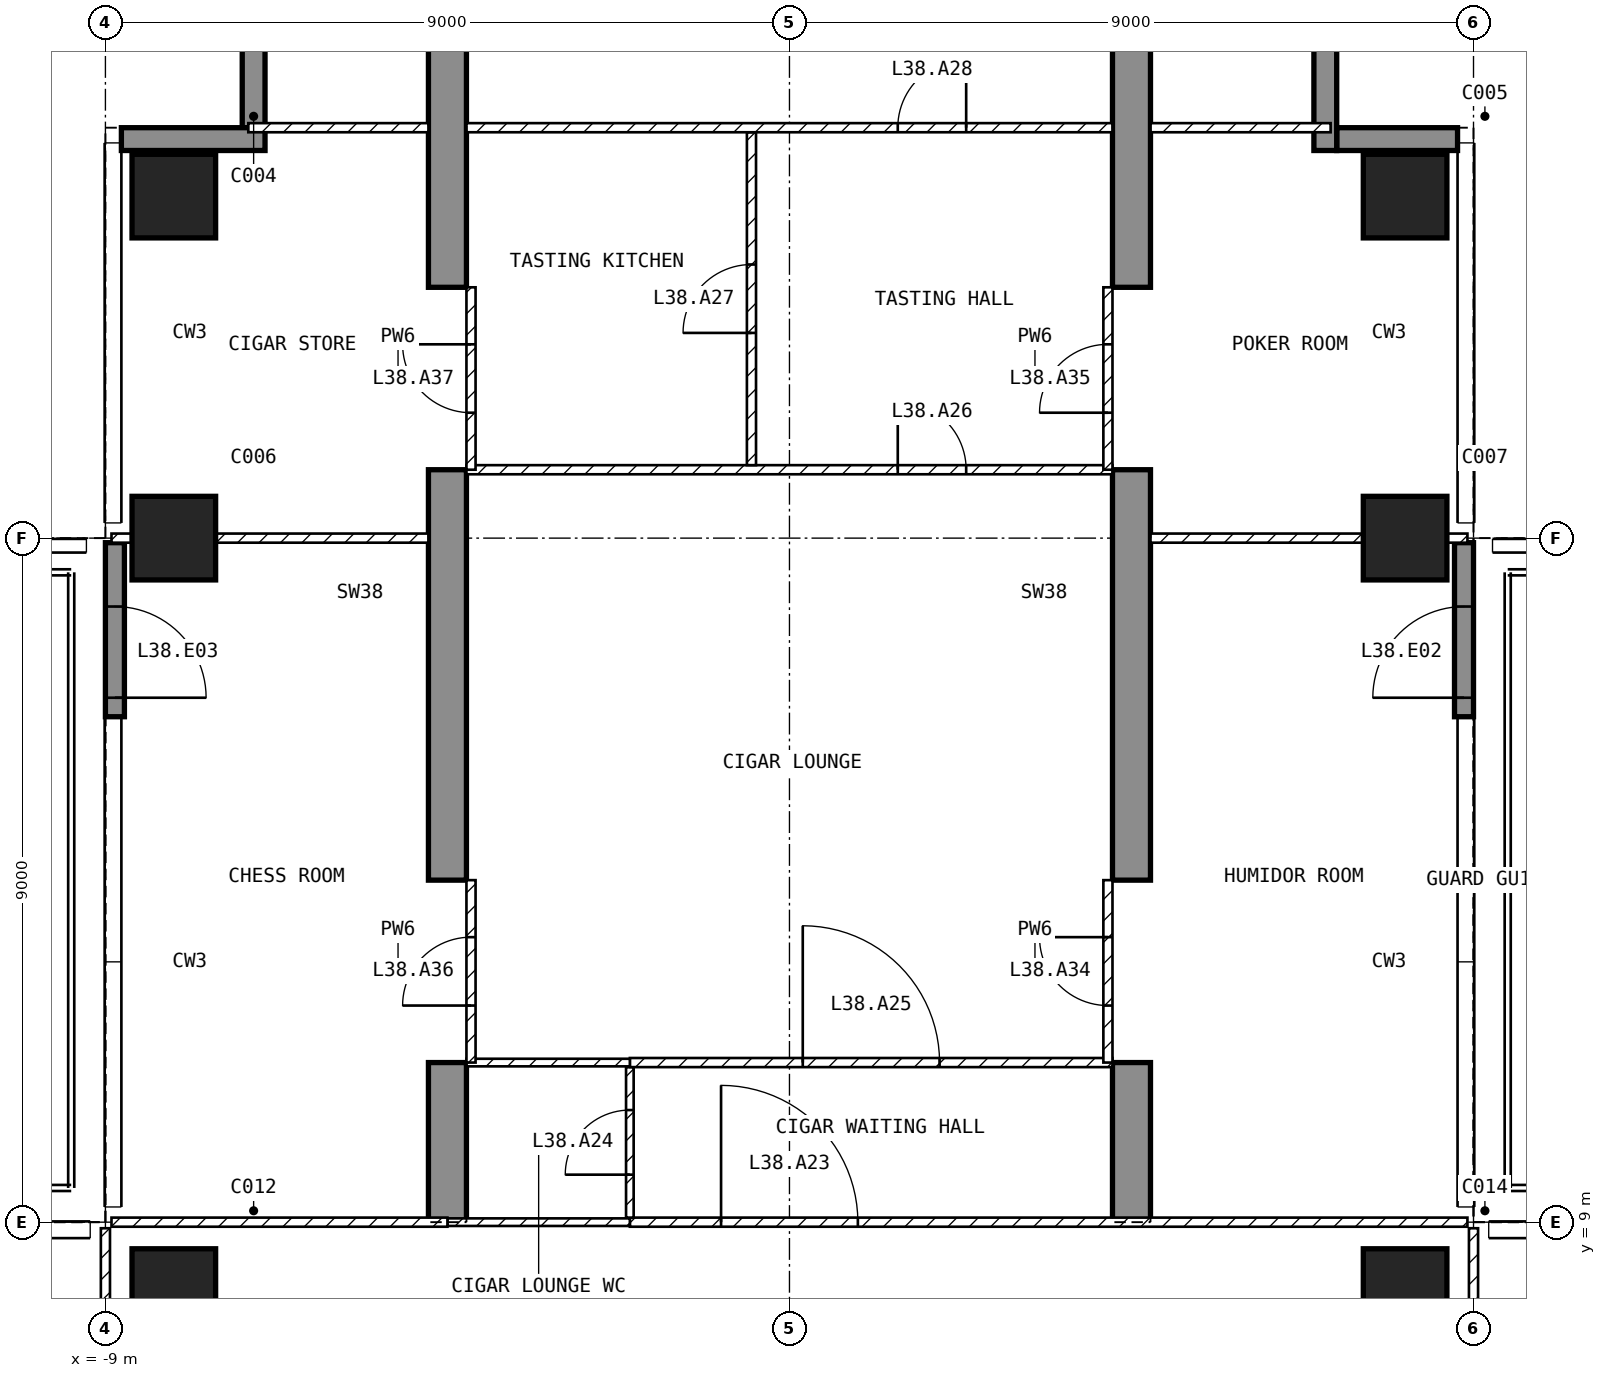
"""IFC4 building model, lengths in metres.
Left out: names, types, materials, properties, quantities, classifications, styles, units other than length and angle.
Written with IfcOpenShell. Run it as: python <this file> out.ifc"""

import sys

from ifc_helpers import new_model, si_unit, direction, frame, frame_2d, origin, origin_2d, place, context, subcontext, project, spatial, polyline, rectangle, outline, extrude, element, fill, save


model = new_model("IFC4")
c1 = context("Model", 3, precision=1e-05, world=origin(), true_north=direction((0.0, 1.0)))
c2 = subcontext(c1, "Body", "Model", "MODEL_VIEW")
j1 = project(units=[si_unit("LENGTHUNIT", "METRE"), si_unit("PLANEANGLEUNIT", "RADIAN")], contexts=[c1])
p1 = place(None, origin())
s1 = spatial("IfcSite", under=j1, at=p1, CompositionType="ELEMENT")
p2 = place(p1, origin())
s2 = spatial("IfcBuilding", under=s1, at=p2, CompositionType="ELEMENT")
p3 = place(p2, frame((0.0, 0.0, 154.9)))
s3 = spatial("IfcBuildingStorey", under=s2, at=p3, CompositionType="ELEMENT", Elevation=154.9)
for number, where, z_axis, x_axis in (
    (1, (-8.1, 8.1, -0.3), (0.0, 0.0, 1.0), (1.0, 0.0, 0.0)),
    (2, (-8.1, 18.0, -0.3), (0.0, 0.0, 1.0), (1.0, 0.0, 0.0)),
    (3, (-8.1, 22.5, -0.3), (0.0, 0.0, 1.0), (1.0, 0.0, 0.0)),
    (4, (8.1, 8.1, -0.3), (0.0, 0.0, 1.0), (1.0, 0.0, 0.0)),
    (5, (8.1, 18.0, -0.3), (0.0, 0.0, 1.0), (1.0, 0.0, 0.0)),
    (6, (8.1, 22.5, -0.3), (0.0, 0.0, 1.0), (1.0, 0.0, 0.0)),
):
    element("IfcColumn", number, at=place(p3, frame(where, z_axis=z_axis, x_axis=x_axis)), inside=s3, PredefinedType="COLUMN", context=c2, shape_type="SweptSolid", body=[
        extrude(rectangle(XDim=1.1, YDim=1.1, at=origin_2d()), origin(), (0.0, 0.0, 1.0), 7.05),
    ])
for number, where, z_axis, x_axis in (
    (7, (-4.75, 9.0, -0.3), (1.0, 0.0, 0.0), (0.0, 1.0, 0.0)),
    (8, (4.25, 9.0, -0.3), (1.0, 0.0, 0.0), (0.0, 1.0, 0.0)),
):
    element("IfcWall", number, at=place(p3, frame(where, z_axis=z_axis, x_axis=x_axis)), inside=s3, PredefinedType="SHEAR", context=c2, shape_type="SweptSolid", body=[
        extrude(outline(polyline([(0.0, 0.0), (2.1, 0.0), (2.1, 2.7), (4.5, 2.7), (4.5, 0.0), (9.9, 0.0), (9.9, 2.7), (12.3, 2.7), (12.3, 0.0), (16.55, 0.0), (16.55, 7.05), (0.0, 7.05), (0.0, 0.0)])), origin(), (0.0, 0.0, 1.0), 0.5),
    ])
p4 = place(p3, frame((8.875, 15.65, 0.0), z_axis=(0.0, 0.0, 1.0), x_axis=(0.0, 1.0, 0.0)))
e9 = element("IfcWall", 9, at=p4, inside=s3, PredefinedType="SOLIDWALL", context=c2, shape_type="SweptSolid", body=[
    extrude(rectangle(XDim=2.29, YDim=0.25, at=frame_2d((1.145, 0.0))), origin(), (0.0, 0.0, 1.0), 6.75),
])
p5 = place(p4, frame((0.25, 0.0, 0.0)))
e10 = element("IfcOpeningElement", 10, at=p5, cuts=e9, PredefinedType="OPENING", context=c2, shape_type="SweptSolid", body=[
    extrude(rectangle(XDim=1.2, YDim=2.4, at=frame_2d((0.6, 1.2))), frame((0.0, 0.135, 0.0), z_axis=(0.0, -1.0, 0.0), x_axis=(1.0, 0.0, 0.0)), (0.0, 0.0, 1.0), 0.27),
])
p6 = place(p3, frame((-8.875, 17.94, 0.0), z_axis=(0.0, 0.0, 1.0), x_axis=(0.0, -1.0, 0.0)))
e11 = element("IfcWall", 11, at=p6, inside=s3, PredefinedType="SOLIDWALL", context=c2, shape_type="SweptSolid", body=[
    extrude(rectangle(XDim=2.29, YDim=0.25, at=frame_2d((1.145, 0.0))), origin(), (0.0, 0.0, 1.0), 6.75),
])
p7 = place(p6, frame((0.84, 0.0, 0.0)))
e12 = element("IfcOpeningElement", 12, at=p7, cuts=e11, PredefinedType="OPENING", context=c2, shape_type="SweptSolid", body=[
    extrude(rectangle(XDim=1.2, YDim=2.4, at=frame_2d((0.6, 1.2))), frame((0.0, 0.135, 0.0), z_axis=(0.0, -1.0, 0.0), x_axis=(1.0, 0.0, 0.0)), (0.0, 0.0, 1.0), 0.27),
])
p8 = place(p3, frame((8.79, 23.25, 0.0), z_axis=(0.0, 0.0, 1.0), x_axis=(-1.0, 0.0, 0.0)))
e13 = element("IfcWall", 13, at=p8, inside=s3, PredefinedType="SOLIDWALL", context=c2, shape_type="SweptSolid", body=[
    extrude(rectangle(XDim=1.59, YDim=0.3, at=frame_2d((0.795, 0.0))), origin(), (0.0, 0.0, 1.0), 6.75),
])
p9 = place(p3, frame((7.05, 23.1, 0.0), z_axis=(0.0, 0.0, 1.0), x_axis=(0.0, 1.0, 0.0)))
e14 = element("IfcWall", 14, at=p9, inside=s3, PredefinedType="SOLIDWALL", context=c2, shape_type="SweptSolid", body=[
    extrude(rectangle(XDim=1.8, YDim=0.3, at=frame_2d((0.9, 0.0))), origin(), (0.0, 0.0, 1.0), 6.75),
])
p10 = place(p3, frame((-7.05, 25.2, 0.0), z_axis=(0.0, 0.0, 1.0), x_axis=(0.0, -1.0, 0.0)))
e15 = element("IfcWall", 15, at=p10, inside=s3, PredefinedType="SOLIDWALL", context=c2, shape_type="SweptSolid", body=[
    extrude(rectangle(XDim=1.8, YDim=0.3, at=frame_2d((0.9, 0.0))), origin(), (0.0, 0.0, 1.0), 6.75),
])
p11 = place(p3, frame((-6.9, 23.25, 0.0), z_axis=(0.0, 0.0, 1.0), x_axis=(-1.0, 0.0, 0.0)))
e16 = element("IfcWall", 16, at=p11, inside=s3, PredefinedType="SOLIDWALL", context=c2, shape_type="SweptSolid", body=[
    extrude(rectangle(XDim=1.89, YDim=0.3, at=frame_2d((0.945, 0.0))), origin(), (0.0, 0.0, 1.0), 6.75),
])
p12 = place(p3, frame((9.0, 8.92, 0.0), z_axis=(0.0, 0.0, 1.0), x_axis=(0.0, -1.0, 0.0)))
e17 = element("IfcWall", 17, at=p12, inside=s3, PredefinedType="PARTITIONING", context=c2, shape_type="SweptSolid", body=[
    extrude(rectangle(XDim=7.66, YDim=0.12, at=frame_2d((3.83, 0.0))), origin(), (0.0, 0.0, 1.0), 6.75),
])
p13 = place(p12, frame((5.74, 0.0, 0.0)))
e18 = element("IfcOpeningElement", 18, at=p13, cuts=e17, PredefinedType="OPENING", context=c2, shape_type="SweptSolid", body=[
    extrude(rectangle(XDim=0.9, YDim=2.1, at=frame_2d((0.45, 1.05))), frame((0.0, 0.07, 0.0), z_axis=(0.0, -1.0, 0.0), x_axis=(1.0, 0.0, 0.0)), (0.0, 0.0, 1.0), 0.14),
])
p14 = place(p3, frame((-9.0, 1.26, 0.0), z_axis=(0.0, 0.0, 1.0), x_axis=(0.0, 1.0, 0.0)))
e19 = element("IfcWall", 19, at=p14, inside=s3, PredefinedType="PARTITIONING", context=c2, shape_type="SweptSolid", body=[
    extrude(rectangle(XDim=7.66, YDim=0.12, at=frame_2d((3.83, 0.0))), origin(), (0.0, 0.0, 1.0), 6.75),
])
p15 = place(p3, frame((-2.1, 9.0, 0.0), z_axis=(0.0, 0.0, 1.0), x_axis=(1.0, 0.0, 0.0)))
e20 = element("IfcWall", 20, at=p15, inside=s3, PredefinedType="PARTITIONING", context=c2, shape_type="SweptSolid", body=[
    extrude(rectangle(XDim=11.02, YDim=0.12, at=frame_2d((5.51, 0.0))), origin(), (0.0, 0.0, 1.0), 6.75),
])
p16 = place(p15, frame((1.2, 0.0, 0.0)))
e21 = element("IfcOpeningElement", 21, at=p16, cuts=e20, PredefinedType="OPENING", context=c2, shape_type="SweptSolid", body=[
    extrude(rectangle(XDim=1.8, YDim=2.1, at=frame_2d((0.9, 1.05))), frame((0.0, 0.07, 0.0), z_axis=(0.0, -1.0, 0.0), x_axis=(1.0, 0.0, 0.0)), (0.0, 0.0, 1.0), 0.14),
])
p17 = place(p3, frame((-4.5, 9.0, 0.0), z_axis=(0.0, 0.0, 1.0), x_axis=(1.0, 0.0, 0.0)))
e22 = element("IfcWall", 22, at=p17, inside=s3, PredefinedType="PARTITIONING", context=c2, shape_type="SweptSolid", body=[
    extrude(rectangle(XDim=2.4, YDim=0.1, at=frame_2d((1.2, 0.0))), origin(), (0.0, 0.0, 1.0), 6.75),
])
p18 = place(p3, frame((-8.92, 9.0, 0.0), z_axis=(0.0, 0.0, 1.0), x_axis=(1.0, 0.0, 0.0)))
e23 = element("IfcWall", 23, at=p18, inside=s3, PredefinedType="PARTITIONING", context=c2, shape_type="SweptSolid", body=[
    extrude(rectangle(XDim=4.42, YDim=0.12, at=frame_2d((2.21, 0.0))), origin(), (0.0, 0.0, 1.0), 6.75),
])
p19 = place(p3, frame((-2.1, 9.06, 0.0), z_axis=(0.0, 0.0, 1.0), x_axis=(0.0, 1.0, 0.0)))
e24 = element("IfcWall", 24, at=p19, inside=s3, PredefinedType="PARTITIONING", context=c2, shape_type="SweptSolid", body=[
    extrude(rectangle(XDim=1.98, YDim=0.1, at=frame_2d((0.99, 0.0))), origin(), (0.0, 0.0, 1.0), 6.75),
])
p20 = place(p19, frame((0.565, 0.0, 0.0)))
e25 = element("IfcOpeningElement", 25, at=p20, cuts=e24, PredefinedType="OPENING", context=c2, shape_type="SweptSolid", body=[
    extrude(rectangle(XDim=0.85, YDim=2.1, at=frame_2d((0.425, 1.05))), frame((0.0, 0.06, 0.0), z_axis=(0.0, -1.0, 0.0), x_axis=(1.0, 0.0, 0.0)), (0.0, 0.0, 1.0), 0.12),
])
p21 = place(p3, frame((-2.1, 11.1, 0.0), z_axis=(0.0, 0.0, 1.0), x_axis=(1.0, 0.0, 0.0)))
e26 = element("IfcWall", 26, at=p21, inside=s3, PredefinedType="PARTITIONING", context=c2, shape_type="SweptSolid", body=[
    extrude(rectangle(XDim=6.35, YDim=0.12, at=frame_2d((3.175, 0.0))), origin(), (0.0, 0.0, 1.0), 6.75),
])
p22 = place(p21, frame((2.275, 0.0, 0.0)))
e27 = element("IfcOpeningElement", 27, at=p22, cuts=e26, PredefinedType="OPENING", context=c2, shape_type="SweptSolid", body=[
    extrude(rectangle(XDim=1.8, YDim=2.1, at=frame_2d((0.9, 1.05))), frame((0.0, 0.07, 0.0), z_axis=(0.0, -1.0, 0.0), x_axis=(1.0, 0.0, 0.0)), (0.0, 0.0, 1.0), 0.14),
])
p23 = place(p3, frame((-4.25, 11.1, 0.0), z_axis=(0.0, 0.0, 1.0), x_axis=(1.0, 0.0, 0.0)))
e28 = element("IfcWall", 28, at=p23, inside=s3, PredefinedType="PARTITIONING", context=c2, shape_type="SweptSolid", body=[
    extrude(rectangle(XDim=2.15, YDim=0.1, at=frame_2d((1.075, 0.0))), origin(), (0.0, 0.0, 1.0), 6.75),
])
p24 = place(p3, frame((-4.25, 18.9, 0.0), z_axis=(0.0, 0.0, 1.0), x_axis=(1.0, 0.0, 0.0)))
e29 = element("IfcWall", 29, at=p24, inside=s3, PredefinedType="PARTITIONING", context=c2, shape_type="SweptSolid", body=[
    extrude(rectangle(XDim=8.5, YDim=0.12, at=frame_2d((4.25, 0.0))), origin(), (0.0, 0.0, 1.0), 6.75),
])
p25 = place(p24, frame((5.675, 0.0, 0.0)))
e30 = element("IfcOpeningElement", 30, at=p25, cuts=e29, PredefinedType="OPENING", context=c2, shape_type="SweptSolid", body=[
    extrude(rectangle(XDim=0.9, YDim=2.1, at=frame_2d((0.45, 1.05))), frame((0.0, 0.07, 0.0), z_axis=(0.0, -1.0, 0.0), x_axis=(1.0, 0.0, 0.0)), (0.0, 0.0, 1.0), 0.14),
])
p26 = place(p3, frame((-0.5, 18.96, 0.0), z_axis=(0.0, 0.0, 1.0), x_axis=(0.0, 1.0, 0.0)))
e31 = element("IfcWall", 31, at=p26, inside=s3, PredefinedType="PARTITIONING", context=c2, shape_type="SweptSolid", body=[
    extrude(rectangle(XDim=4.38, YDim=0.12, at=frame_2d((2.19, 0.0))), origin(), (0.0, 0.0, 1.0), 6.75),
])
p27 = place(p26, frame((1.74, 0.0, 0.0)))
e32 = element("IfcOpeningElement", 32, at=p27, cuts=e31, PredefinedType="OPENING", context=c2, shape_type="SweptSolid", body=[
    extrude(rectangle(XDim=0.9, YDim=2.1, at=frame_2d((0.45, 1.05))), frame((0.0, 0.07, 0.0), z_axis=(0.0, -1.0, 0.0), x_axis=(1.0, 0.0, 0.0)), (0.0, 0.0, 1.0), 0.14),
])
p28 = place(p3, frame((-4.25, 23.4, 0.0), z_axis=(0.0, 0.0, 1.0), x_axis=(1.0, 0.0, 0.0)))
e33 = element("IfcWall", 33, at=p28, inside=s3, PredefinedType="PARTITIONING", context=c2, shape_type="SweptSolid", body=[
    extrude(rectangle(XDim=8.5, YDim=0.12, at=frame_2d((4.25, 0.0))), origin(), (0.0, 0.0, 1.0), 6.75),
])
p29 = place(p28, frame((5.675, 0.0, 0.0)))
e34 = element("IfcOpeningElement", 34, at=p29, cuts=e33, PredefinedType="OPENING", context=c2, shape_type="SweptSolid", body=[
    extrude(rectangle(XDim=0.9, YDim=2.1, at=frame_2d((0.45, 1.05))), frame((0.0, 0.07, 0.0), z_axis=(0.0, -1.0, 0.0), x_axis=(1.0, 0.0, 0.0)), (0.0, 0.0, 1.0), 0.14),
])
p30 = place(p3, frame((4.75, 18.0, 0.0), z_axis=(0.0, 0.0, 1.0), x_axis=(1.0, 0.0, 0.0)))
e35 = element("IfcWall", 35, at=p30, inside=s3, PredefinedType="PARTITIONING", context=c2, shape_type="SweptSolid", body=[
    extrude(rectangle(XDim=4.17, YDim=0.12, at=frame_2d((2.085, 0.0))), origin(), (0.0, 0.0, 1.0), 5.914),
])
p31 = place(p3, frame((4.75, 23.4, 0.0), z_axis=(0.0, 0.0, 1.0), x_axis=(1.0, 0.0, 0.0)))
e36 = element("IfcWall", 36, at=p31, inside=s3, PredefinedType="PARTITIONING", context=c2, shape_type="SweptSolid", body=[
    extrude(rectangle(XDim=2.37, YDim=0.12, at=frame_2d((1.185, 0.0))), origin(), (0.0, 0.0, 1.0), 6.75),
])
p32 = place(p3, frame((-8.92, 18.0, 0.0), z_axis=(0.0, 0.0, 1.0), x_axis=(1.0, 0.0, 0.0)))
e37 = element("IfcWall", 37, at=p32, inside=s3, PredefinedType="PARTITIONING", context=c2, shape_type="SweptSolid", body=[
    extrude(rectangle(XDim=4.17, YDim=0.12, at=frame_2d((2.085, 0.0))), origin(), (0.0, 0.0, 1.0), 5.914),
])
p33 = place(p3, frame((-7.12, 23.4, 0.0), z_axis=(0.0, 0.0, 1.0), x_axis=(1.0, 0.0, 0.0)))
e38 = element("IfcWall", 38, at=p33, inside=s3, PredefinedType="PARTITIONING", context=c2, shape_type="SweptSolid", body=[
    extrude(rectangle(XDim=2.37, YDim=0.12, at=frame_2d((1.185, 0.0))), origin(), (0.0, 0.0, 1.0), 6.75),
])
p34 = place(p3, frame((4.19, 11.1, 0.0), z_axis=(0.0, 0.0, 1.0), x_axis=(0.0, 1.0, 0.0)))
e39 = element("IfcWall", 39, at=p34, inside=s3, PredefinedType="PARTITIONING", context=c2, shape_type="SweptSolid", body=[
    extrude(rectangle(XDim=2.4, YDim=0.12, at=frame_2d((1.2, 0.0))), origin(), (0.0, 0.0, 1.0), 2.4),
])
p35 = place(p34, frame((0.75, 0.0, 0.0)))
e40 = element("IfcOpeningElement", 40, at=p35, cuts=e39, PredefinedType="OPENING", context=c2, shape_type="SweptSolid", body=[
    extrude(rectangle(XDim=0.9, YDim=2.1, at=frame_2d((0.45, 1.05))), frame((0.0, 0.07, 0.0), z_axis=(0.0, -1.0, 0.0), x_axis=(1.0, 0.0, 0.0)), (0.0, 0.0, 1.0), 0.14),
])
p36 = place(p3, frame((4.19, 18.9, 0.0), z_axis=(0.0, 0.0, 1.0), x_axis=(0.0, 1.0, 0.0)))
e41 = element("IfcWall", 41, at=p36, inside=s3, PredefinedType="PARTITIONING", context=c2, shape_type="SweptSolid", body=[
    extrude(rectangle(XDim=2.4, YDim=0.12, at=frame_2d((1.2, 0.0))), origin(), (0.0, 0.0, 1.0), 2.4),
])
p37 = place(p36, frame((0.75, 0.0, 0.0)))
e42 = element("IfcOpeningElement", 42, at=p37, cuts=e41, PredefinedType="OPENING", context=c2, shape_type="SweptSolid", body=[
    extrude(rectangle(XDim=0.9, YDim=2.1, at=frame_2d((0.45, 1.05))), frame((0.0, 0.07, 0.0), z_axis=(0.0, -1.0, 0.0), x_axis=(1.0, 0.0, 0.0)), (0.0, 0.0, 1.0), 0.14),
])
p38 = place(p3, frame((-4.19, 11.1, 0.0), z_axis=(0.0, 0.0, 1.0), x_axis=(0.0, 1.0, 0.0)))
e43 = element("IfcWall", 43, at=p38, inside=s3, PredefinedType="PARTITIONING", context=c2, shape_type="SweptSolid", body=[
    extrude(rectangle(XDim=2.4, YDim=0.12, at=frame_2d((1.2, 0.0))), origin(), (0.0, 0.0, 1.0), 2.4),
])
p39 = place(p38, frame((0.75, 0.0, 0.0)))
e44 = element("IfcOpeningElement", 44, at=p39, cuts=e43, PredefinedType="OPENING", context=c2, shape_type="SweptSolid", body=[
    extrude(rectangle(XDim=0.9, YDim=2.1, at=frame_2d((0.45, 1.05))), frame((0.0, 0.07, 0.0), z_axis=(0.0, -1.0, 0.0), x_axis=(1.0, 0.0, 0.0)), (0.0, 0.0, 1.0), 0.14),
])
p40 = place(p3, frame((-4.19, 18.9, 0.0), z_axis=(0.0, 0.0, 1.0), x_axis=(0.0, 1.0, 0.0)))
e45 = element("IfcWall", 45, at=p40, inside=s3, PredefinedType="PARTITIONING", context=c2, shape_type="SweptSolid", body=[
    extrude(rectangle(XDim=2.4, YDim=0.12, at=frame_2d((1.2, 0.0))), origin(), (0.0, 0.0, 1.0), 2.4),
])
p41 = place(p40, frame((0.75, 0.0, 0.0)))
e46 = element("IfcOpeningElement", 46, at=p41, cuts=e45, PredefinedType="OPENING", context=c2, shape_type="SweptSolid", body=[
    extrude(rectangle(XDim=0.9, YDim=2.1, at=frame_2d((0.45, 1.05))), frame((0.0, 0.07, 0.0), z_axis=(0.0, -1.0, 0.0), x_axis=(1.0, 0.0, 0.0)), (0.0, 0.0, 1.0), 0.14),
])
p42 = place(p5, origin())
e47 = element("IfcDoor", 47, at=p42, inside=s3, OperationType="SINGLE_SWING_LEFT", PredefinedType="DOOR", context=c2, shape_type="SweptSolid", body=[
    extrude(rectangle(XDim=1.2, YDim=2.4, at=frame_2d((0.6, 1.2))), frame((0.0, 0.025, 0.0), z_axis=(0.0, -1.0, 0.0), x_axis=(1.0, 0.0, 0.0)), (0.0, 0.0, 1.0), 0.05),
])
fill(e10, e47)
p43 = place(p7, origin())
e48 = element("IfcDoor", 48, at=p43, inside=s3, OperationType="SINGLE_SWING_RIGHT", PredefinedType="DOOR", context=c2, shape_type="SweptSolid", body=[
    extrude(rectangle(XDim=1.2, YDim=2.4, at=frame_2d((0.6, 1.2))), frame((0.0, 0.025, 0.0), z_axis=(0.0, -1.0, 0.0), x_axis=(1.0, 0.0, 0.0)), (0.0, 0.0, 1.0), 0.05),
])
fill(e12, e48)
p44 = place(p16, origin())
e49 = element("IfcDoor", 49, at=p44, inside=s3, OperationType="SINGLE_SWING_LEFT", PredefinedType="DOOR", context=c2, shape_type="SweptSolid", body=[
    extrude(rectangle(XDim=1.8, YDim=2.1, at=frame_2d((0.9, 1.05))), frame((0.0, 0.025, 0.0), z_axis=(0.0, -1.0, 0.0), x_axis=(1.0, 0.0, 0.0)), (0.0, 0.0, 1.0), 0.05),
])
fill(e21, e49)
p45 = place(p20, origin())
e50 = element("IfcDoor", 50, at=p45, inside=s3, OperationType="SINGLE_SWING_LEFT", PredefinedType="DOOR", context=c2, shape_type="SweptSolid", body=[
    extrude(rectangle(XDim=0.85, YDim=2.1, at=frame_2d((0.425, 1.05))), frame((0.0, 0.025, 0.0), z_axis=(0.0, -1.0, 0.0), x_axis=(1.0, 0.0, 0.0)), (0.0, 0.0, 1.0), 0.05),
])
fill(e25, e50)
p46 = place(p22, origin())
e51 = element("IfcDoor", 51, at=p46, inside=s3, OperationType="SINGLE_SWING_LEFT", PredefinedType="DOOR", context=c2, shape_type="SweptSolid", body=[
    extrude(rectangle(XDim=1.8, YDim=2.1, at=frame_2d((0.9, 1.05))), frame((0.0, 0.025, 0.0), z_axis=(0.0, -1.0, 0.0), x_axis=(1.0, 0.0, 0.0)), (0.0, 0.0, 1.0), 0.05),
])
fill(e27, e51)
p47 = place(p25, origin())
e52 = element("IfcDoor", 52, at=p47, inside=s3, OperationType="SINGLE_SWING_LEFT", PredefinedType="DOOR", context=c2, shape_type="SweptSolid", body=[
    extrude(rectangle(XDim=0.9, YDim=2.1, at=frame_2d((0.45, 1.05))), frame((0.0, 0.025, 0.0), z_axis=(0.0, -1.0, 0.0), x_axis=(1.0, 0.0, 0.0)), (0.0, 0.0, 1.0), 0.05),
])
fill(e30, e52)
p48 = place(p27, origin())
e53 = element("IfcDoor", 53, at=p48, inside=s3, OperationType="SINGLE_SWING_LEFT", PredefinedType="DOOR", context=c2, shape_type="SweptSolid", body=[
    extrude(rectangle(XDim=0.9, YDim=2.1, at=frame_2d((0.45, 1.05))), frame((0.0, 0.025, 0.0), z_axis=(0.0, -1.0, 0.0), x_axis=(1.0, 0.0, 0.0)), (0.0, 0.0, 1.0), 0.05),
])
fill(e32, e53)
p49 = place(p29, origin())
e54 = element("IfcDoor", 54, at=p49, inside=s3, OperationType="SINGLE_SWING_RIGHT", PredefinedType="DOOR", context=c2, shape_type="SweptSolid", body=[
    extrude(rectangle(XDim=0.9, YDim=2.1, at=frame_2d((0.45, 1.05))), frame((0.0, 0.025, 0.0), z_axis=(0.0, -1.0, 0.0), x_axis=(1.0, 0.0, 0.0)), (0.0, 0.0, 1.0), 0.05),
])
fill(e34, e54)
p50 = place(p35, origin())
e55 = element("IfcDoor", 55, at=p50, inside=s3, OperationType="SINGLE_SWING_RIGHT", PredefinedType="DOOR", context=c2, shape_type="SweptSolid", body=[
    extrude(rectangle(XDim=0.9, YDim=2.1, at=frame_2d((0.45, 1.05))), frame((0.0, 0.025, 0.0), z_axis=(0.0, -1.0, 0.0), x_axis=(1.0, 0.0, 0.0)), (0.0, 0.0, 1.0), 0.05),
])
fill(e40, e55)
p51 = place(p37, origin())
e56 = element("IfcDoor", 56, at=p51, inside=s3, OperationType="SINGLE_SWING_LEFT", PredefinedType="DOOR", context=c2, shape_type="SweptSolid", body=[
    extrude(rectangle(XDim=0.9, YDim=2.1, at=frame_2d((0.45, 1.05))), frame((0.0, 0.025, 0.0), z_axis=(0.0, -1.0, 0.0), x_axis=(1.0, 0.0, 0.0)), (0.0, 0.0, 1.0), 0.05),
])
fill(e42, e56)
p52 = place(p39, origin())
e57 = element("IfcDoor", 57, at=p52, inside=s3, OperationType="SINGLE_SWING_LEFT", PredefinedType="DOOR", context=c2, shape_type="SweptSolid", body=[
    extrude(rectangle(XDim=0.9, YDim=2.1, at=frame_2d((0.45, 1.05))), frame((0.0, 0.025, 0.0), z_axis=(0.0, -1.0, 0.0), x_axis=(1.0, 0.0, 0.0)), (0.0, 0.0, 1.0), 0.05),
])
fill(e44, e57)
p53 = place(p41, origin())
e58 = element("IfcDoor", 58, at=p53, inside=s3, OperationType="SINGLE_SWING_RIGHT", PredefinedType="DOOR", context=c2, shape_type="SweptSolid", body=[
    extrude(rectangle(XDim=0.9, YDim=2.1, at=frame_2d((0.45, 1.05))), frame((0.0, 0.025, 0.0), z_axis=(0.0, -1.0, 0.0), x_axis=(1.0, 0.0, 0.0)), (0.0, 0.0, 1.0), 0.05),
])
fill(e46, e58)
save(model, sys.argv[1])
